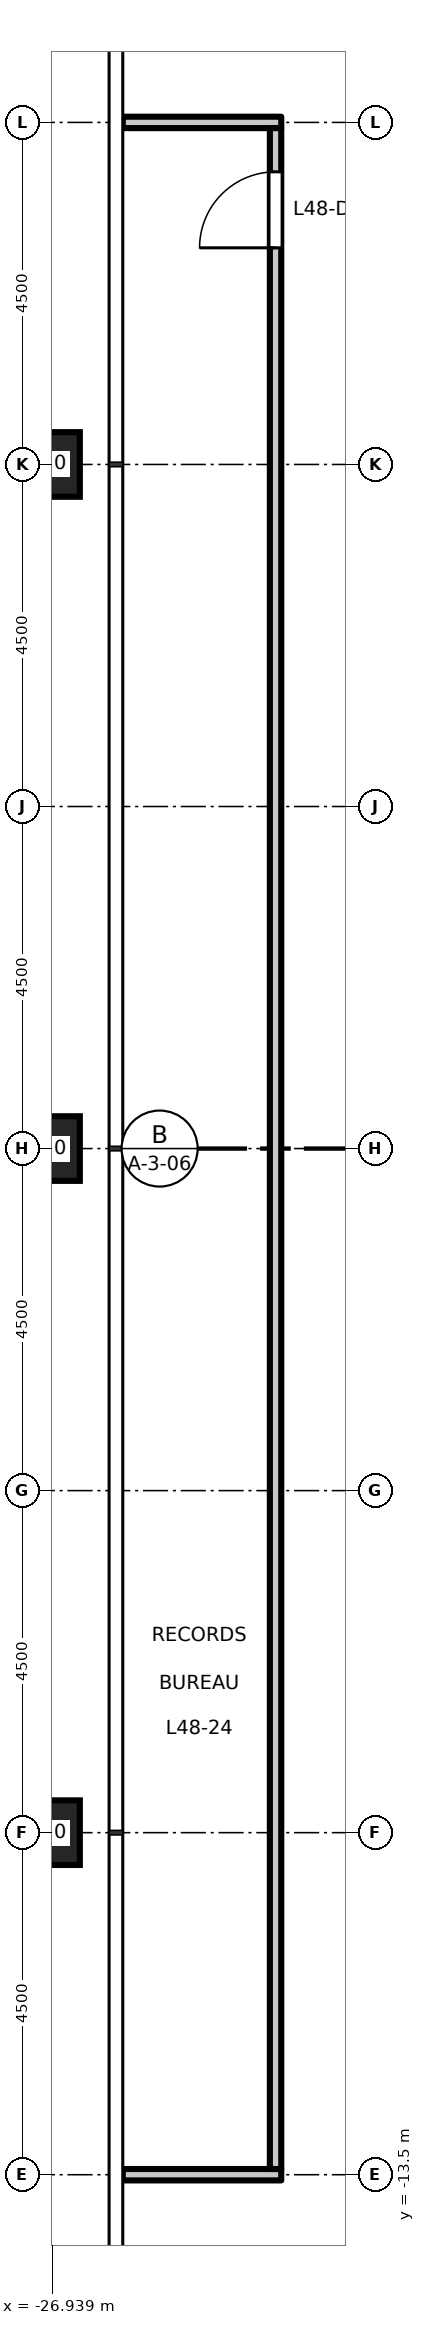
"""IFC4 building model, lengths in metres.
Left out: names, types, materials, properties, quantities, classifications, styles, units other than length and angle.
Written with IfcOpenShell. Run it as: python <this file> out.ifc"""

import sys

from ifc_helpers import new_model, si_unit, direction, frame, frame_2d, origin, origin_2d, place, context, subcontext, project, spatial, rectangle, hollow_rectangle, extrude, element, fill, save


model = new_model("IFC4")
c1 = context("Model", 3, precision=1e-05, world=origin(), true_north=direction((0.0, 1.0)))
c2 = subcontext(c1, "Body", "Model", "MODEL_VIEW")
j1 = project(units=[si_unit("LENGTHUNIT", "METRE"), si_unit("PLANEANGLEUNIT", "RADIAN")], contexts=[c1])
p1 = place(None, origin())
s1 = spatial("IfcSite", under=j1, at=p1, CompositionType="ELEMENT")
p2 = place(p1, origin())
s2 = spatial("IfcBuilding", under=s1, at=p2, CompositionType="ELEMENT")
p3 = place(p2, frame((0.0, 0.0, 224.2)))
s3 = spatial("IfcBuildingStorey", under=s2, at=p3, CompositionType="ELEMENT", Elevation=224.2)
for number, where, z_axis, x_axis in (
    (1, (-27.0, 9.0, 0.0), (0.0, 0.0, 1.0), (1.0, 0.0, 0.0)),
    (2, (-27.0, 0.0, 0.0), (0.0, 0.0, 1.0), (1.0, 0.0, 0.0)),
    (3, (-27.0, -9.0, 0.0), (0.0, 0.0, 1.0), (1.0, 0.0, 0.0)),
):
    element("IfcColumn", number, at=place(p3, frame(where, z_axis=z_axis, x_axis=x_axis)), inside=s3, PredefinedType="COLUMN", context=c2, shape_type="SweptSolid", body=[
        extrude(hollow_rectangle(XDim=0.85, YDim=0.85, WallThickness=0.05, at=origin_2d()), origin(), (0.0, 0.0, 1.0), 4.5),
    ])
p4 = place(p3, frame((-26.01, -13.5, 0.0), z_axis=(0.0, 0.0, 1.0), x_axis=(1.0, 0.0, 0.0)))
e4 = element("IfcWall", 4, at=p4, inside=s3, PredefinedType="PARTITIONING", context=c2, shape_type="SweptSolid", body=[
    extrude(rectangle(XDim=2.085, YDim=0.15, at=frame_2d((1.042, 0.0))), origin(), (0.0, 0.0, 1.0), 3.95),
])
p5 = place(p3, frame((-26.01, 13.5, 0.0), z_axis=(0.0, 0.0, 1.0), x_axis=(1.0, 0.0, 0.0)))
e5 = element("IfcWall", 5, at=p5, inside=s3, PredefinedType="PARTITIONING", context=c2, shape_type="SweptSolid", body=[
    extrude(rectangle(XDim=2.085, YDim=0.15, at=frame_2d((1.042, 0.0))), origin(), (0.0, 0.0, 1.0), 4.35),
])
p6 = place(p3, frame((-24.0, -13.425, 0.0), z_axis=(0.0, 0.0, 1.0), x_axis=(0.0, 1.0, 0.0)))
e6 = element("IfcWall", 6, at=p6, inside=s3, PredefinedType="PARTITIONING", context=c2, shape_type="SweptSolid", body=[
    extrude(rectangle(XDim=26.85, YDim=0.15, at=frame_2d((13.425, 0.0))), origin(), (0.0, 0.0, 1.0), 4.35),
])
p7 = place(p6, frame((25.275, 0.0, 0.0)))
e7 = element("IfcOpeningElement", 7, at=p7, cuts=e6, PredefinedType="OPENING", context=c2, shape_type="SweptSolid", body=[
    extrude(rectangle(XDim=1.0, YDim=2.1, at=frame_2d((0.5, 1.05))), frame((0.0, 0.085, 0.0), z_axis=(0.0, -1.0, 0.0), x_axis=(1.0, 0.0, 0.0)), (0.0, 0.0, 1.0), 0.17),
])
p8 = place(p7, origin())
e8 = element("IfcDoor", 8, at=p8, inside=s3, OperationType="SINGLE_SWING_LEFT", PredefinedType="DOOR", context=c2, shape_type="SweptSolid", body=[
    extrude(rectangle(XDim=1.0, YDim=2.1, at=frame_2d((0.5, 1.05))), frame((0.0, 0.025, 0.0), z_axis=(0.0, -1.0, 0.0), x_axis=(1.0, 0.0, 0.0)), (0.0, 0.0, 1.0), 0.05),
])
fill(e7, e8)
save(model, sys.argv[1])
